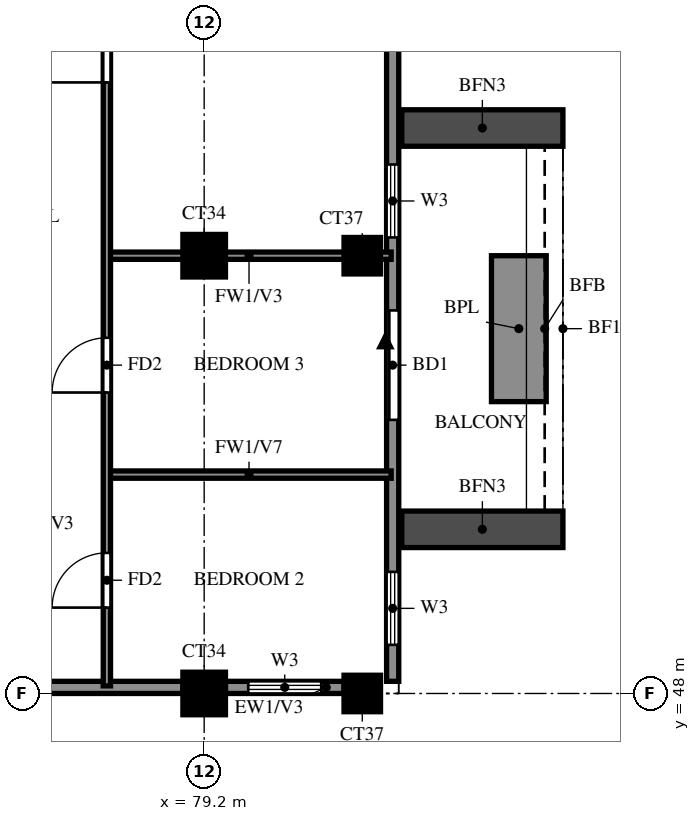
"""IFC4 building model, lengths in metres.
Left out: names, types, materials, properties, quantities, classifications, styles, units other than length and angle.
Written with IfcOpenShell. Run it as: python <this file> out.ifc"""

import sys

from ifc_helpers import new_model, si_unit, direction, frame, frame_2d, origin, origin_2d, place, context, subcontext, project, spatial, rectangle, extrude, source, transform, mapped, element, fill, save


model = new_model("IFC4")
c1 = context("Model", 3, precision=1e-05, world=origin(), true_north=direction((0.0, 1.0)))
c2 = subcontext(c1, "Body", "Model", "MODEL_VIEW")
j1 = project(units=[si_unit("LENGTHUNIT", "METRE"), si_unit("PLANEANGLEUNIT", "RADIAN")], contexts=[c1])
p1 = place(None, origin())
s1 = spatial("IfcSite", under=j1, at=p1, CompositionType="ELEMENT")
p2 = place(p1, origin())
s2 = spatial("IfcBuilding", under=s1, at=p2, CompositionType="ELEMENT")
p3 = place(p2, frame((0.0, 0.0, 253.5)))
s3 = spatial("IfcBuildingStorey", under=s2, at=p3, CompositionType="ELEMENT", Elevation=253.5)
m1 = source(origin(), c2, "Body", "SweptSolid", [
    extrude(rectangle(XDim=0.7, YDim=0.7, at=origin_2d()), origin(), (0.0, 0.0, 1.0), 3.22),
])
p4 = place(p3, frame((79.2, 48.0, 0.0), z_axis=(0.0, 0.0, 1.0), x_axis=(1.0, 0.0, 0.0)))
e1 = element("IfcColumn", 1, at=p4, inside=s3, PredefinedType="COLUMN", context=c2, shape_type="MappedRepresentation", body=[
    mapped(m1, transform((0.0, 0.0, 0.0))),
])
m2 = source(origin(), c2, "Body", "SweptSolid", [
    extrude(rectangle(XDim=0.6, YDim=0.6, at=origin_2d()), origin(), (0.0, 0.0, 1.0), 3.22),
])
p5 = place(p3, frame((81.8, 48.0, 0.0), z_axis=(0.0, 0.0, 1.0), x_axis=(1.0, 0.0, 0.0)))
e2 = element("IfcColumn", 2, at=p5, inside=s3, PredefinedType="COLUMN", context=c2, shape_type="MappedRepresentation", body=[
    mapped(m2, transform((0.0, 0.0, 0.0))),
])
p6 = place(p3, frame((79.2, 55.2, 0.0), z_axis=(0.0, 0.0, 1.0), x_axis=(1.0, 0.0, 0.0)))
e3 = element("IfcColumn", 3, at=p6, inside=s3, PredefinedType="COLUMN", context=c2, shape_type="MappedRepresentation", body=[
    mapped(m1, transform((0.0, 0.0, 0.0))),
])
p7 = place(p3, frame((81.8, 55.2, 0.0), z_axis=(0.0, 0.0, 1.0), x_axis=(1.0, 0.0, 0.0)))
e4 = element("IfcColumn", 4, at=p7, inside=s3, PredefinedType="COLUMN", context=c2, shape_type="MappedRepresentation", body=[
    mapped(m2, transform((0.0, 0.0, 0.0))),
])
p8 = place(p3, frame((81.907, 39.87, 0.0), z_axis=(0.0, 0.0, 1.0), x_axis=(-0.777936274417, 0.62834318087, 0.0)))
e5 = element("IfcWall", 5, at=p8, inside=s3, PredefinedType="SOLIDWALL", context=c2, shape_type="SweptSolid", body=[
    extrude(rectangle(XDim=13.099, YDim=0.2, at=frame_2d((6.549, 0.0))), origin(), (0.0, 0.0, 1.0), 3.22),
])
p9 = place(p8, frame((9.938, 0.0, 1.5)))
e6 = element("IfcOpeningElement", 6, at=p9, cuts=e5, PredefinedType="OPENING", context=c2, shape_type="SweptSolid", body=[
    extrude(rectangle(XDim=0.9, YDim=0.9, at=frame_2d((0.45, 0.45))), frame((0.0, 0.11, 0.0), z_axis=(0.0, -1.0, 0.0), x_axis=(1.0, 0.0, 0.0)), (0.0, 0.0, 1.0), 0.22),
])
p10 = place(p3, frame((71.987, 48.1, 0.0), z_axis=(0.0, 0.0, 1.0), x_axis=(1.0, 0.0, 0.0)))
e7 = element("IfcWall", 7, at=p10, inside=s3, PredefinedType="SOLIDWALL", context=c2, shape_type="SweptSolid", body=[
    extrude(rectangle(XDim=6.863, YDim=0.2, at=frame_2d((3.432, 0.0))), origin(), (0.0, 0.0, 1.0), 3.22),
])
p11 = place(p3, frame((79.55, 48.1, 0.0), z_axis=(0.0, 0.0, 1.0), x_axis=(1.0, 0.0, 0.0)))
e8 = element("IfcWall", 8, at=p11, inside=s3, PredefinedType="SOLIDWALL", context=c2, shape_type="SweptSolid", body=[
    extrude(rectangle(XDim=1.95, YDim=0.2, at=frame_2d((0.975, 0.0))), origin(), (0.0, 0.0, 1.0), 3.22),
])
p12 = place(p11, frame((0.375, 0.0, 0.6)))
e9 = element("IfcOpeningElement", 9, at=p12, cuts=e8, PredefinedType="OPENING", context=c2, shape_type="SweptSolid", body=[
    extrude(rectangle(XDim=1.2, YDim=2.4, at=frame_2d((0.6, 1.2))), frame((0.0, 0.11, 0.0), z_axis=(0.0, -1.0, 0.0), x_axis=(1.0, 0.0, 0.0)), (0.0, 0.0, 1.0), 0.22),
])
p13 = place(p3, frame((82.3, 48.2, 0.0), z_axis=(0.0, 0.0, 1.0), x_axis=(0.0, 1.0, 0.0)))
e10 = element("IfcWall", 10, at=p13, inside=s3, PredefinedType="SOLIDWALL", context=c2, shape_type="SweptSolid", body=[
    extrude(rectangle(XDim=28.6, YDim=0.2, at=frame_2d((14.3, 0.0))), origin(), (0.0, 0.0, 1.0), 3.22),
])
p14 = place(p13, frame((4.3, 0.0, 0.0)))
e11 = element("IfcOpeningElement", 11, at=p14, cuts=e10, PredefinedType="OPENING", context=c2, shape_type="SweptSolid", body=[
    extrude(rectangle(XDim=1.8, YDim=2.4, at=frame_2d((0.9, 1.2))), frame((0.0, 0.11, 0.0), z_axis=(0.0, -1.0, 0.0), x_axis=(1.0, 0.0, 0.0)), (0.0, 0.0, 1.0), 0.22),
])
p15 = place(p13, frame((18.7, 0.0, 0.0)))
e12 = element("IfcOpeningElement", 12, at=p15, cuts=e10, PredefinedType="OPENING", context=c2, shape_type="SweptSolid", body=[
    extrude(rectangle(XDim=1.8, YDim=2.4, at=frame_2d((0.9, 1.2))), frame((0.0, 0.11, 0.0), z_axis=(0.0, -1.0, 0.0), x_axis=(1.0, 0.0, 0.0)), (0.0, 0.0, 1.0), 0.22),
])
p16 = place(p13, frame((0.6, 0.0, 0.6)))
e13 = element("IfcOpeningElement", 13, at=p16, cuts=e10, PredefinedType="OPENING", context=c2, shape_type="SweptSolid", body=[
    extrude(rectangle(XDim=1.2, YDim=2.4, at=frame_2d((0.6, 1.2))), frame((0.0, 0.11, 0.0), z_axis=(0.0, -1.0, 0.0), x_axis=(1.0, 0.0, 0.0)), (0.0, 0.0, 1.0), 0.22),
])
p17 = place(p13, frame((7.3, 0.0, 0.6)))
e14 = element("IfcOpeningElement", 14, at=p17, cuts=e10, PredefinedType="OPENING", context=c2, shape_type="SweptSolid", body=[
    extrude(rectangle(XDim=1.2, YDim=2.4, at=frame_2d((0.6, 1.2))), frame((0.0, 0.11, 0.0), z_axis=(0.0, -1.0, 0.0), x_axis=(1.0, 0.0, 0.0)), (0.0, 0.0, 1.0), 0.22),
])
p18 = place(p13, frame((10.6, 0.0, 0.6)))
e15 = element("IfcOpeningElement", 15, at=p18, cuts=e10, PredefinedType="OPENING", context=c2, shape_type="SweptSolid", body=[
    extrude(rectangle(XDim=2.4, YDim=2.4, at=frame_2d((1.2, 1.2))), frame((0.0, 0.11, 0.0), z_axis=(0.0, -1.0, 0.0), x_axis=(1.0, 0.0, 0.0)), (0.0, 0.0, 1.0), 0.22),
])
p19 = place(p13, frame((14.5, 0.0, 0.6)))
e16 = element("IfcOpeningElement", 16, at=p19, cuts=e10, PredefinedType="OPENING", context=c2, shape_type="SweptSolid", body=[
    extrude(rectangle(XDim=1.8, YDim=2.4, at=frame_2d((0.9, 1.2))), frame((0.0, 0.11, 0.0), z_axis=(0.0, -1.0, 0.0), x_axis=(1.0, 0.0, 0.0)), (0.0, 0.0, 1.0), 0.22),
])
p20 = place(p13, frame((21.85, 0.0, 1.5)))
e17 = element("IfcOpeningElement", 17, at=p20, cuts=e10, PredefinedType="OPENING", context=c2, shape_type="SweptSolid", body=[
    extrude(rectangle(XDim=0.9, YDim=0.9, at=frame_2d((0.45, 0.45))), frame((0.0, 0.11, 0.0), z_axis=(0.0, -1.0, 0.0), x_axis=(1.0, 0.0, 0.0)), (0.0, 0.0, 1.0), 0.22),
])
p21 = place(p13, frame((23.95, 0.0, 1.5)))
e18 = element("IfcOpeningElement", 18, at=p21, cuts=e10, PredefinedType="OPENING", context=c2, shape_type="SweptSolid", body=[
    extrude(rectangle(XDim=0.9, YDim=0.9, at=frame_2d((0.45, 0.45))), frame((0.0, 0.11, 0.0), z_axis=(0.0, -1.0, 0.0), x_axis=(1.0, 0.0, 0.0)), (0.0, 0.0, 1.0), 0.22),
])
p22 = place(p13, frame((25.5, 0.0, 0.6)))
e19 = element("IfcOpeningElement", 19, at=p22, cuts=e10, PredefinedType="OPENING", context=c2, shape_type="SweptSolid", body=[
    extrude(rectangle(XDim=2.4, YDim=2.4, at=frame_2d((1.2, 1.2))), frame((0.0, 0.11, 0.0), z_axis=(0.0, -1.0, 0.0), x_axis=(1.0, 0.0, 0.0)), (0.0, 0.0, 1.0), 0.22),
])
for number, where, z_axis, x_axis in (
    (20, (82.45, 50.7, 0.0), (0.0, 0.0, 1.0), (1.0, 0.0, 0.0)),
    (21, (82.45, 57.3, 0.0), (0.0, 0.0, 1.0), (1.0, 0.0, 0.0)),
):
    element("IfcWall", number, at=place(p3, frame(where, z_axis=z_axis, x_axis=x_axis)), inside=s3, PredefinedType="SOLIDWALL", context=c2, shape_type="SweptSolid", body=[
        extrude(rectangle(XDim=2.65, YDim=0.6, at=frame_2d((1.325, 0.0))), origin(), (0.0, 0.0, 1.0), 2.85),
    ])
p23 = place(p3, frame((84.375, 52.8, 0.0), z_axis=(0.0, 0.0, 1.0), x_axis=(0.0, 1.0, 0.0)))
e22 = element("IfcWall", 22, at=p23, inside=s3, PredefinedType="SOLIDWALL", context=c2, shape_type="SweptSolid", body=[
    extrude(rectangle(XDim=2.4, YDim=0.9, at=frame_2d((1.2, 0.0))), origin(), (0.0, 0.0, 1.0), 0.9),
])
p24 = place(p3, frame((77.6, 51.6, 0.0), z_axis=(0.0, 0.0, 1.0), x_axis=(1.0, 0.0, 0.0)))
e23 = element("IfcWall", 23, at=p24, inside=s3, PredefinedType="PARTITIONING", context=c2, shape_type="SweptSolid", body=[
    extrude(rectangle(XDim=4.675, YDim=0.12, at=frame_2d((2.337, 0.0))), origin(), (0.0, 0.0, 1.0), 2.32),
])
p25 = place(p3, frame((77.6, 55.2, 0.0), z_axis=(0.0, 0.0, 1.0), x_axis=(1.0, 0.0, 0.0)))
e24 = element("IfcWall", 24, at=p25, inside=s3, PredefinedType="PARTITIONING", context=c2, shape_type="SweptSolid", body=[
    extrude(rectangle(XDim=4.675, YDim=0.12, at=frame_2d((2.337, 0.0))), origin(), (0.0, 0.0, 1.0), 3.22),
])
p26 = place(p3, frame((77.6, 48.125, 0.0), z_axis=(0.0, 0.0, 1.0), x_axis=(0.0, 1.0, 0.0)))
e25 = element("IfcWall", 25, at=p26, inside=s3, PredefinedType="PARTITIONING", context=c2, shape_type="SweptSolid", body=[
    extrude(rectangle(XDim=21.475, YDim=0.12, at=frame_2d((10.738, 0.0))), origin(), (0.0, 0.0, 1.0), 3.22),
])
p27 = place(p26, frame((1.288, 0.0, 0.0)))
e26 = element("IfcOpeningElement", 26, at=p27, cuts=e25, PredefinedType="OPENING", context=c2, shape_type="SweptSolid", body=[
    extrude(rectangle(XDim=0.9, YDim=2.1, at=frame_2d((0.45, 1.05))), frame((0.0, 0.07, 0.0), z_axis=(0.0, -1.0, 0.0), x_axis=(1.0, 0.0, 0.0)), (0.0, 0.0, 1.0), 0.14),
])
p28 = place(p26, frame((4.825, 0.0, 0.0)))
e27 = element("IfcOpeningElement", 27, at=p28, cuts=e25, PredefinedType="OPENING", context=c2, shape_type="SweptSolid", body=[
    extrude(rectangle(XDim=0.9, YDim=2.1, at=frame_2d((0.45, 1.05))), frame((0.0, 0.07, 0.0), z_axis=(0.0, -1.0, 0.0), x_axis=(1.0, 0.0, 0.0)), (0.0, 0.0, 1.0), 0.14),
])
p29 = place(p26, frame((9.925, 0.0, 0.0)))
e28 = element("IfcOpeningElement", 28, at=p29, cuts=e25, PredefinedType="OPENING", context=c2, shape_type="SweptSolid", body=[
    extrude(rectangle(XDim=1.5, YDim=2.1, at=frame_2d((0.75, 1.05))), frame((0.0, 0.07, 0.0), z_axis=(0.0, -1.0, 0.0), x_axis=(1.0, 0.0, 0.0)), (0.0, 0.0, 1.0), 0.14),
])
p30 = place(p26, frame((15.625, 0.0, 0.0)))
e29 = element("IfcOpeningElement", 29, at=p30, cuts=e25, PredefinedType="OPENING", context=c2, shape_type="SweptSolid", body=[
    extrude(rectangle(XDim=0.9, YDim=2.1, at=frame_2d((0.45, 1.05))), frame((0.0, 0.07, 0.0), z_axis=(0.0, -1.0, 0.0), x_axis=(1.0, 0.0, 0.0)), (0.0, 0.0, 1.0), 0.14),
])
p31 = place(p26, frame((19.225, 0.0, 0.0)))
e30 = element("IfcOpeningElement", 30, at=p31, cuts=e25, PredefinedType="OPENING", context=c2, shape_type="SweptSolid", body=[
    extrude(rectangle(XDim=0.9, YDim=2.1, at=frame_2d((0.45, 1.05))), frame((0.0, 0.07, 0.0), z_axis=(0.0, -1.0, 0.0), x_axis=(1.0, 0.0, 0.0)), (0.0, 0.0, 1.0), 0.14),
])
p32 = place(p12, origin())
e31 = element("IfcWindow", 31, at=p32, inside=s3, PartitioningType="SINGLE_PANEL", PredefinedType="WINDOW", context=c2, shape_type="SweptSolid", body=[
    extrude(rectangle(XDim=1.2, YDim=2.4, at=frame_2d((0.6, 1.2))), frame((0.0, 0.03, 0.0), z_axis=(0.0, -1.0, 0.0), x_axis=(1.0, 0.0, 0.0)), (0.0, 0.0, 1.0), 0.06),
])
fill(e9, e31)
p33 = place(p14, origin())
e32 = element("IfcDoor", 32, at=p33, inside=s3, OperationType="DOUBLE_DOOR_SLIDING", PredefinedType="DOOR", context=c2, shape_type="SweptSolid", body=[
    extrude(rectangle(XDim=1.8, YDim=2.4, at=frame_2d((0.9, 1.2))), frame((0.0, 0.025, 0.0), z_axis=(0.0, -1.0, 0.0), x_axis=(1.0, 0.0, 0.0)), (0.0, 0.0, 1.0), 0.05),
])
fill(e11, e32)
p34 = place(p16, origin())
e33 = element("IfcWindow", 33, at=p34, inside=s3, PartitioningType="SINGLE_PANEL", PredefinedType="WINDOW", context=c2, shape_type="SweptSolid", body=[
    extrude(rectangle(XDim=1.2, YDim=2.4, at=frame_2d((0.6, 1.2))), frame((0.0, 0.03, 0.0), z_axis=(0.0, -1.0, 0.0), x_axis=(1.0, 0.0, 0.0)), (0.0, 0.0, 1.0), 0.06),
])
fill(e13, e33)
p35 = place(p17, origin())
e34 = element("IfcWindow", 34, at=p35, inside=s3, PartitioningType="SINGLE_PANEL", PredefinedType="WINDOW", context=c2, shape_type="SweptSolid", body=[
    extrude(rectangle(XDim=1.2, YDim=2.4, at=frame_2d((0.6, 1.2))), frame((0.0, 0.03, 0.0), z_axis=(0.0, -1.0, 0.0), x_axis=(1.0, 0.0, 0.0)), (0.0, 0.0, 1.0), 0.06),
])
fill(e14, e34)
p36 = place(p27, origin())
e35 = element("IfcDoor", 35, at=p36, inside=s3, OperationType="SINGLE_SWING_RIGHT", PredefinedType="DOOR", context=c2, shape_type="SweptSolid", body=[
    extrude(rectangle(XDim=0.9, YDim=2.1, at=frame_2d((0.45, 1.05))), frame((0.0, 0.025, 0.0), z_axis=(0.0, -1.0, 0.0), x_axis=(1.0, 0.0, 0.0)), (0.0, 0.0, 1.0), 0.05),
])
fill(e26, e35)
p37 = place(p28, origin())
e36 = element("IfcDoor", 36, at=p37, inside=s3, OperationType="SINGLE_SWING_LEFT", PredefinedType="DOOR", context=c2, shape_type="SweptSolid", body=[
    extrude(rectangle(XDim=0.9, YDim=2.1, at=frame_2d((0.45, 1.05))), frame((0.0, 0.025, 0.0), z_axis=(0.0, -1.0, 0.0), x_axis=(1.0, 0.0, 0.0)), (0.0, 0.0, 1.0), 0.05),
])
fill(e27, e36)
p38 = place(p29, origin())
e37 = element("IfcDoor", 37, at=p38, inside=s3, OperationType="SINGLE_SWING_LEFT", PredefinedType="DOOR", context=c2, shape_type="SweptSolid", body=[
    extrude(rectangle(XDim=1.5, YDim=2.1, at=frame_2d((0.75, 1.05))), frame((0.0, 0.025, 0.0), z_axis=(0.0, -1.0, 0.0), x_axis=(1.0, 0.0, 0.0)), (0.0, 0.0, 1.0), 0.05),
])
fill(e28, e37)
save(model, sys.argv[1])
